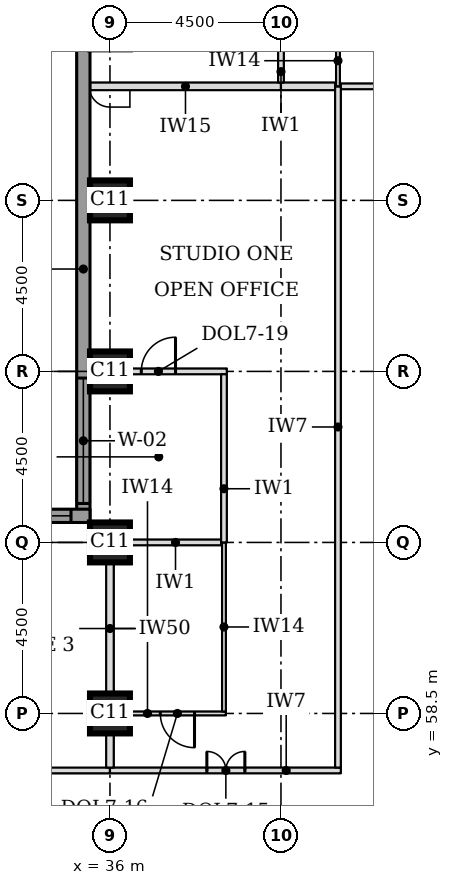
"""IFC4 building model, lengths in metres.
Left out: names, types, materials, properties, quantities, classifications, styles, units other than length and angle.
Written with IfcOpenShell. Run it as: python <this file> out.ifc"""

import sys

from ifc_helpers import new_model, si_unit, direction, frame, frame_2d, origin, origin_2d, place, context, subcontext, project, spatial, rectangle, extrude, element, fill, save


model = new_model("IFC4")
c1 = context("Model", 3, precision=1e-05, world=origin(), true_north=direction((0.0, 1.0)))
c2 = subcontext(c1, "Body", "Model", "MODEL_VIEW")
j1 = project(units=[si_unit("LENGTHUNIT", "METRE"), si_unit("PLANEANGLEUNIT", "RADIAN")], contexts=[c1])
p1 = place(None, origin())
s1 = spatial("IfcSite", under=j1, at=p1, CompositionType="ELEMENT")
p2 = place(p1, origin())
s2 = spatial("IfcBuilding", under=s1, at=p2, CompositionType="ELEMENT")
p3 = place(p2, frame((0.0, 0.0, 127.0)))
s3 = spatial("IfcBuildingStorey", under=s2, at=p3, CompositionType="ELEMENT", Elevation=127.0)
for number, where, z_axis, x_axis in (
    (1, (36.0, 58.5, 0.0), (0.0, 0.0, 1.0), (1.0, 0.0, 0.0)),
    (2, (36.0, 63.0, 0.0), (0.0, 0.0, 1.0), (1.0, 0.0, 0.0)),
    (3, (36.0, 67.5, 0.0), (0.0, 0.0, 1.0), (1.0, 0.0, 0.0)),
    (4, (36.0, 72.0, 0.0), (0.0, 0.0, 1.0), (1.0, 0.0, 0.0)),
):
    element("IfcColumn", number, at=place(p3, frame(where, z_axis=z_axis, x_axis=x_axis)), inside=s3, PredefinedType="COLUMN", context=c2, shape_type="SweptSolid", body=[
        extrude(rectangle(XDim=1.05, YDim=1.05, at=origin_2d()), origin(), (0.0, 0.0, 1.0), 3.7),
    ])
p4 = place(p3, frame((35.3, 76.862, 0.0), z_axis=(0.0, 0.0, 1.0), x_axis=(0.0, -1.0, 0.0)))
e5 = element("IfcWall", 5, at=p4, inside=s3, PredefinedType="STANDARD", context=c2, shape_type="SweptSolid", body=[
    extrude(rectangle(XDim=13.337, YDim=0.35, at=frame_2d((6.669, 0.0))), origin(), (0.0, 0.0, 1.0), 3.525),
])
p5 = place(p4, frame((9.537, 0.0, 0.9)))
e6 = element("IfcOpeningElement", 6, at=p5, cuts=e5, PredefinedType="OPENING", context=c2, shape_type="SweptSolid", body=[
    extrude(rectangle(XDim=3.3, YDim=1.9, at=frame_2d((1.65, 0.95))), frame((0.0, 0.185, 0.0), z_axis=(0.0, -1.0, 0.0), x_axis=(1.0, 0.0, 0.0)), (0.0, 0.0, 1.0), 0.37),
])
p6 = place(p3, frame((35.475, 63.7, 0.0), z_axis=(0.0, 0.0, 1.0), x_axis=(-1.0, 0.0, 0.0)))
e7 = element("IfcWall", 7, at=p6, inside=s3, PredefinedType="STANDARD", context=c2, shape_type="SweptSolid", body=[
    extrude(rectangle(XDim=17.837, YDim=0.35, at=frame_2d((8.919, 0.0))), origin(), (0.0, 0.0, 1.0), 3.525),
])
p7 = place(p6, frame((0.5, 0.0, 0.9)))
e8 = element("IfcOpeningElement", 8, at=p7, cuts=e7, PredefinedType="OPENING", context=c2, shape_type="SweptSolid", body=[
    extrude(rectangle(XDim=3.3, YDim=1.9, at=frame_2d((1.65, 0.95))), frame((0.0, 0.185, 0.0), z_axis=(0.0, -1.0, 0.0), x_axis=(1.0, 0.0, 0.0)), (0.0, 0.0, 1.0), 0.37),
])
p8 = place(p6, frame((9.075, 0.0, 0.9)))
e9 = element("IfcOpeningElement", 9, at=p8, cuts=e7, PredefinedType="OPENING", context=c2, shape_type="SweptSolid", body=[
    extrude(rectangle(XDim=3.3, YDim=1.9, at=frame_2d((1.65, 0.95))), frame((0.0, 0.185, 0.0), z_axis=(0.0, -1.0, 0.0), x_axis=(1.0, 0.0, 0.0)), (0.0, 0.0, 1.0), 0.37),
])
p9 = place(p3, frame((29.38, 57.0, 0.0), z_axis=(0.0, 0.0, 1.0), x_axis=(1.0, 0.0, 0.0)))
e10 = element("IfcWall", 10, at=p9, inside=s3, PredefinedType="PARTITIONING", context=c2, shape_type="SweptSolid", body=[
    extrude(rectangle(XDim=6.62, YDim=0.15, at=frame_2d((3.31, 0.0))), origin(), (0.0, 0.0, 1.0), 3.55),
])
p10 = place(p9, frame((2.88, 0.0, 0.0)))
e11 = element("IfcOpeningElement", 11, at=p10, cuts=e10, PredefinedType="OPENING", context=c2, shape_type="SweptSolid", body=[
    extrude(rectangle(XDim=1.0, YDim=2.1, at=frame_2d((0.5, 1.05))), frame((0.0, 0.085, 0.0), z_axis=(0.0, -1.0, 0.0), x_axis=(1.0, 0.0, 0.0)), (0.0, 0.0, 1.0), 0.17),
])
p11 = place(p3, frame((36.0, 57.0, 0.0), z_axis=(0.0, 0.0, 1.0), x_axis=(1.0, 0.0, 0.0)))
e12 = element("IfcWall", 12, at=p11, inside=s3, PredefinedType="PARTITIONING", context=c2, shape_type="SweptSolid", body=[
    extrude(rectangle(XDim=6.075, YDim=0.15, at=frame_2d((3.038, 0.0))), origin(), (0.0, 0.0, 1.0), 3.55),
])
p12 = place(p11, frame((2.55, 0.0, 0.0)))
e13 = element("IfcOpeningElement", 13, at=p12, cuts=e12, PredefinedType="OPENING", context=c2, shape_type="SweptSolid", body=[
    extrude(rectangle(XDim=1.0, YDim=2.1, at=frame_2d((0.5, 1.05))), frame((0.0, 0.085, 0.0), z_axis=(0.0, -1.0, 0.0), x_axis=(1.0, 0.0, 0.0)), (0.0, 0.0, 1.0), 0.17),
])
p13 = place(p3, frame((36.525, 58.5, 0.0), z_axis=(0.0, 0.0, 1.0), x_axis=(1.0, 0.0, 0.0)))
e14 = element("IfcWall", 14, at=p13, inside=s3, PredefinedType="PARTITIONING", context=c2, shape_type="SweptSolid", body=[
    extrude(rectangle(XDim=2.525, YDim=0.1, at=frame_2d((1.263, 0.0))), origin(), (0.0, 0.0, 1.0), 3.55),
])
p14 = place(p13, frame((0.8, 0.0, 0.0)))
e15 = element("IfcOpeningElement", 15, at=p14, cuts=e14, PredefinedType="OPENING", context=c2, shape_type="SweptSolid", body=[
    extrude(rectangle(XDim=0.9, YDim=2.1, at=frame_2d((0.45, 1.05))), frame((0.0, 0.06, 0.0), z_axis=(0.0, -1.0, 0.0), x_axis=(1.0, 0.0, 0.0)), (0.0, 0.0, 1.0), 0.12),
])
p15 = place(p3, frame((36.525, 63.0, 0.0), z_axis=(0.0, 0.0, 1.0), x_axis=(1.0, 0.0, 0.0)))
e16 = element("IfcWall", 16, at=p15, inside=s3, PredefinedType="PARTITIONING", context=c2, shape_type="SweptSolid", body=[
    extrude(rectangle(XDim=2.4, YDim=0.15, at=frame_2d((1.2, 0.0))), origin(), (0.0, 0.0, 1.0), 3.55),
])
p16 = place(p3, frame((35.475, 67.5, 0.0), z_axis=(0.0, 0.0, 1.0), x_axis=(1.0, 0.0, 0.0)))
e17 = element("IfcWall", 17, at=p16, inside=s3, PredefinedType="PARTITIONING", context=c2, shape_type="SweptSolid", body=[
    extrude(rectangle(XDim=3.6, YDim=0.15, at=frame_2d((1.8, 0.0))), origin(), (0.0, 0.0, 1.0), 3.55),
])
p17 = place(p16, frame((1.35, 0.0, 0.0)))
e18 = element("IfcOpeningElement", 18, at=p17, cuts=e17, PredefinedType="OPENING", context=c2, shape_type="SweptSolid", body=[
    extrude(rectangle(XDim=0.9, YDim=2.1, at=frame_2d((0.45, 1.05))), frame((0.0, 0.085, 0.0), z_axis=(0.0, -1.0, 0.0), x_axis=(1.0, 0.0, 0.0)), (0.0, 0.0, 1.0), 0.17),
])
p18 = place(p3, frame((35.475, 75.0, 0.0), z_axis=(0.0, 0.0, 1.0), x_axis=(1.0, 0.0, 0.0)))
e19 = element("IfcWall", 19, at=p18, inside=s3, PredefinedType="PARTITIONING", context=c2, shape_type="SweptSolid", body=[
    extrude(rectangle(XDim=5.025, YDim=0.2, at=frame_2d((2.512, 0.0))), origin(), (0.0, 0.0, 1.0), 3.55),
])
p19 = place(p3, frame((40.5, 75.0, 0.0), z_axis=(0.0, 0.0, 1.0), x_axis=(1.0, 0.0, 0.0)))
e20 = element("IfcWall", 20, at=p19, inside=s3, PredefinedType="PARTITIONING", context=c2, shape_type="SweptSolid", body=[
    extrude(rectangle(XDim=1.425, YDim=0.2, at=frame_2d((0.712, 0.0))), origin(), (0.0, 0.0, 1.0), 3.55),
])
p20 = place(p3, frame((42.075, 75.0, 0.0), z_axis=(0.0, 0.0, 1.0), x_axis=(1.0, 0.0, 0.0)))
e21 = element("IfcWall", 21, at=p20, inside=s3, PredefinedType="PARTITIONING", context=c2, shape_type="SweptSolid", body=[
    extrude(rectangle(XDim=4.425, YDim=0.15, at=frame_2d((2.212, 0.0))), origin(), (0.0, 0.0, 1.0), 3.55),
])
p21 = place(p20, frame((1.7, 0.0, 0.0)))
e22 = element("IfcOpeningElement", 22, at=p21, cuts=e21, PredefinedType="OPENING", context=c2, shape_type="SweptSolid", body=[
    extrude(rectangle(XDim=1.0, YDim=2.1, at=frame_2d((0.5, 1.05))), frame((0.0, 0.085, 0.0), z_axis=(0.0, -1.0, 0.0), x_axis=(1.0, 0.0, 0.0)), (0.0, 0.0, 1.0), 0.17),
])
p22 = place(p3, frame((36.0, 57.075, 0.0), z_axis=(0.0, 0.0, 1.0), x_axis=(0.0, 1.0, 0.0)))
e23 = element("IfcWall", 23, at=p22, inside=s3, PredefinedType="PARTITIONING", context=c2, shape_type="SweptSolid", body=[
    extrude(rectangle(XDim=0.9, YDim=0.2, at=frame_2d((0.45, 0.0))), origin(), (0.0, 0.0, 1.0), 2.8),
])
p23 = place(p3, frame((42.0, 57.075, 0.0), z_axis=(0.0, 0.0, 1.0), x_axis=(0.0, 1.0, 0.0)))
e24 = element("IfcWall", 24, at=p23, inside=s3, PredefinedType="PARTITIONING", context=c2, shape_type="SweptSolid", body=[
    extrude(rectangle(XDim=17.925, YDim=0.15, at=frame_2d((8.962, 0.0))), origin(), (0.0, 0.0, 1.0), 3.55),
])
p24 = place(p3, frame((39.0, 58.55, 0.0), z_axis=(0.0, 0.0, 1.0), x_axis=(0.0, 1.0, 0.0)))
e25 = element("IfcWall", 25, at=p24, inside=s3, PredefinedType="PARTITIONING", context=c2, shape_type="SweptSolid", body=[
    extrude(rectangle(XDim=4.45, YDim=0.1, at=frame_2d((2.225, 0.0))), origin(), (0.0, 0.0, 1.0), 3.55),
])
p25 = place(p3, frame((36.0, 58.995, 0.0), z_axis=(0.0, 0.0, 1.0), x_axis=(0.0, 1.0, 0.0)))
e26 = element("IfcWall", 26, at=p25, inside=s3, PredefinedType="PARTITIONING", context=c2, shape_type="SweptSolid", body=[
    extrude(rectangle(XDim=3.48, YDim=0.2, at=frame_2d((1.74, 0.0))), origin(), (0.0, 0.0, 1.0), 2.8),
])
p26 = place(p3, frame((39.0, 63.0, 0.0), z_axis=(0.0, 0.0, 1.0), x_axis=(0.0, 1.0, 0.0)))
e27 = element("IfcWall", 27, at=p26, inside=s3, PredefinedType="PARTITIONING", context=c2, shape_type="SweptSolid", body=[
    extrude(rectangle(XDim=4.425, YDim=0.15, at=frame_2d((2.212, 0.0))), origin(), (0.0, 0.0, 1.0), 3.55),
])
p27 = place(p3, frame((42.0, 75.0, 0.0), z_axis=(0.0, 0.0, 1.0), x_axis=(0.0, 1.0, 0.0)))
e28 = element("IfcWall", 28, at=p27, inside=s3, PredefinedType="PARTITIONING", context=c2, shape_type="SweptSolid", body=[
    extrude(rectangle(XDim=2.95, YDim=0.1, at=frame_2d((1.475, 0.0))), origin(), (0.0, 0.0, 1.0), 3.55),
])
p28 = place(p3, frame((40.5, 75.1, 0.0), z_axis=(0.0, 0.0, 1.0), x_axis=(0.0, 1.0, 0.0)))
e29 = element("IfcWall", 29, at=p28, inside=s3, PredefinedType="PARTITIONING", context=c2, shape_type="SweptSolid", body=[
    extrude(rectangle(XDim=5.375, YDim=0.15, at=frame_2d((2.688, 0.0))), origin(), (0.0, 0.0, 1.0), 3.55),
])
p29 = place(p28, frame((2.25, 0.0, 0.0)))
e30 = element("IfcOpeningElement", 30, at=p29, cuts=e29, PredefinedType="OPENING", context=c2, shape_type="SweptSolid", body=[
    extrude(rectangle(XDim=0.9, YDim=2.1, at=frame_2d((0.45, 1.05))), frame((0.0, 0.085, 0.0), z_axis=(0.0, -1.0, 0.0), x_axis=(1.0, 0.0, 0.0)), (0.0, 0.0, 1.0), 0.17),
])
p30 = place(p5, origin())
e31 = element("IfcWindow", 31, at=p30, inside=s3, PartitioningType="SINGLE_PANEL", PredefinedType="WINDOW", context=c2, shape_type="SweptSolid", body=[
    extrude(rectangle(XDim=3.3, YDim=1.9, at=frame_2d((1.65, 0.95))), frame((0.0, 0.085, 0.0), z_axis=(0.0, -1.0, 0.0), x_axis=(1.0, 0.0, 0.0)), (0.0, 0.0, 1.0), 0.06),
])
fill(e6, e31)
p31 = place(p7, origin())
e32 = element("IfcWindow", 32, at=p31, inside=s3, PartitioningType="SINGLE_PANEL", PredefinedType="WINDOW", context=c2, shape_type="SweptSolid", body=[
    extrude(rectangle(XDim=3.3, YDim=1.9, at=frame_2d((1.65, 0.95))), frame((0.0, 0.085, 0.0), z_axis=(0.0, -1.0, 0.0), x_axis=(1.0, 0.0, 0.0)), (0.0, 0.0, 1.0), 0.06),
])
fill(e8, e32)
p32 = place(p12, origin())
e33 = element("IfcDoor", 33, at=p32, inside=s3, OperationType="DOUBLE_DOOR_SINGLE_SWING", PredefinedType="DOOR", context=c2, shape_type="SweptSolid", body=[
    extrude(rectangle(XDim=1.0, YDim=2.1, at=frame_2d((0.5, 1.05))), frame((0.0, 0.025, 0.0), z_axis=(0.0, -1.0, 0.0), x_axis=(1.0, 0.0, 0.0)), (0.0, 0.0, 1.0), 0.05),
])
fill(e13, e33)
p33 = place(p14, frame((0.9, 0.0, 0.0), z_axis=(0.0, 0.0, 1.0), x_axis=(-1.0, 0.0, 0.0)))
e34 = element("IfcDoor", 34, at=p33, inside=s3, OperationType="SINGLE_SWING_LEFT", PredefinedType="DOOR", context=c2, shape_type="SweptSolid", body=[
    extrude(rectangle(XDim=0.9, YDim=2.1, at=frame_2d((0.45, 1.05))), frame((0.0, 0.025, 0.0), z_axis=(0.0, -1.0, 0.0), x_axis=(1.0, 0.0, 0.0)), (0.0, 0.0, 1.0), 0.05),
])
fill(e15, e34)
p34 = place(p17, origin())
e35 = element("IfcDoor", 35, at=p34, inside=s3, OperationType="SINGLE_SWING_RIGHT", PredefinedType="DOOR", context=c2, shape_type="SweptSolid", body=[
    extrude(rectangle(XDim=0.9, YDim=2.1, at=frame_2d((0.45, 1.05))), frame((0.0, 0.025, 0.0), z_axis=(0.0, -1.0, 0.0), x_axis=(1.0, 0.0, 0.0)), (0.0, 0.0, 1.0), 0.05),
])
fill(e18, e35)
save(model, sys.argv[1])
